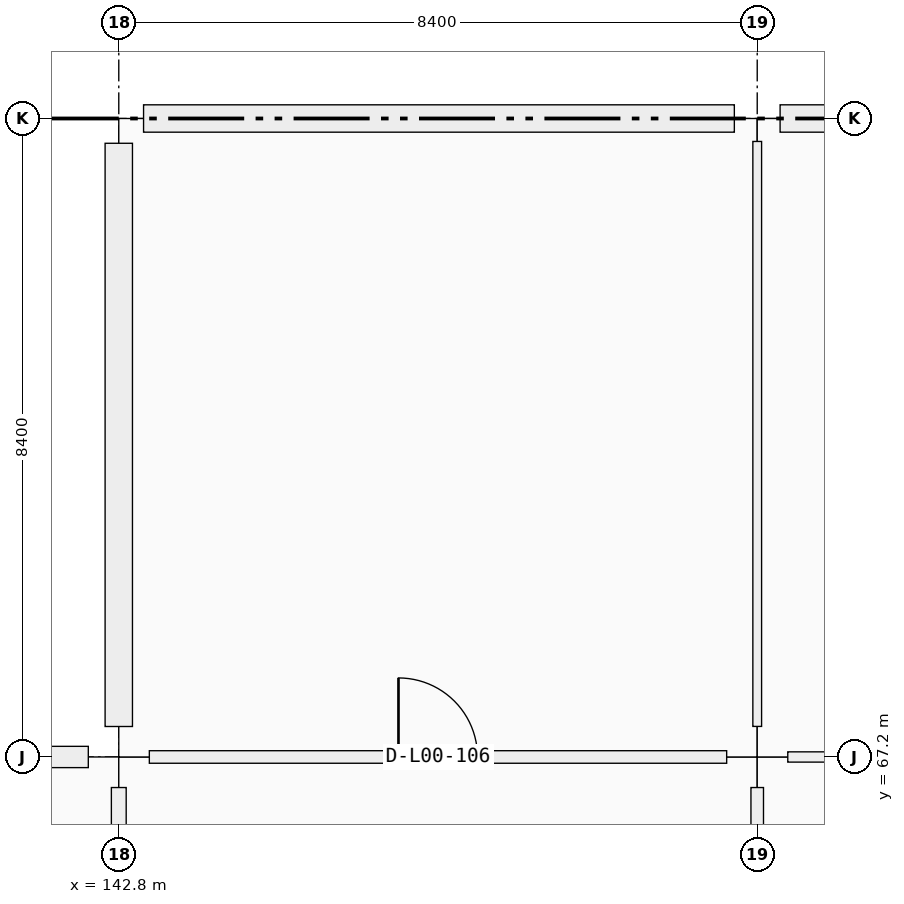
"""IFC4 building model, lengths in metres.
Left out: names, types, materials, properties, quantities, classifications, styles, units other than length and angle.
Written with IfcOpenShell. Run it as: python <this file> out.ifc"""

import sys

from ifc_helpers import new_model, si_unit, direction, frame, frame_2d, origin, origin_2d, place, context, subcontext, project, spatial, rectangle, extrude, element, fill, save


model = new_model("IFC4")
c1 = context("Model", 3, precision=1e-05, world=origin(), true_north=direction((0.0, 1.0)))
c2 = subcontext(c1, "Body", "Model", "MODEL_VIEW")
j1 = project(units=[si_unit("LENGTHUNIT", "METRE"), si_unit("PLANEANGLEUNIT", "RADIAN")], contexts=[c1])
p1 = place(None, origin())
s1 = spatial("IfcSite", under=j1, at=p1, CompositionType="ELEMENT")
p2 = place(p1, origin())
s2 = spatial("IfcBuilding", under=s1, at=p2, CompositionType="ELEMENT")
p3 = place(p2, origin())
s3 = spatial("IfcBuildingStorey", under=s2, at=p3, CompositionType="ELEMENT", Elevation=0.0)
p4 = place(p3, frame((142.8, 67.2, 0.0), z_axis=(0.0, 0.0, 1.0), x_axis=(1.0, 0.0, 0.0)))
e1 = element("IfcColumn", 1, at=p4, inside=s3, PredefinedType="COLUMN", context=c2, shape_type="SweptSolid", body=[
    extrude(rectangle(XDim=0.8, YDim=0.8, at=origin_2d()), origin(), (0.0, 0.0, 1.0), 5.76),
])
p5 = place(p3, frame((142.8, 75.6, 0.0), z_axis=(0.0, 0.0, 1.0), x_axis=(1.0, 0.0, 0.0)))
e2 = element("IfcColumn", 2, at=p5, inside=s3, PredefinedType="COLUMN", context=c2, shape_type="SweptSolid", body=[
    extrude(rectangle(XDim=0.65, YDim=0.65, at=origin_2d()), origin(), (0.0, 0.0, 1.0), 5.76),
])
p6 = place(p3, frame((151.2, 67.2, 0.0), z_axis=(0.0, 0.0, 1.0), x_axis=(1.0, 0.0, 0.0)))
e3 = element("IfcColumn", 3, at=p6, inside=s3, PredefinedType="COLUMN", context=c2, shape_type="SweptSolid", body=[
    extrude(rectangle(XDim=0.8, YDim=0.8, at=origin_2d()), origin(), (0.0, 0.0, 1.0), 5.76),
])
p7 = place(p3, frame((151.2, 75.6, 0.0), z_axis=(0.0, 0.0, 1.0), x_axis=(1.0, 0.0, 0.0)))
e4 = element("IfcColumn", 4, at=p7, inside=s3, PredefinedType="COLUMN", context=c2, shape_type="SweptSolid", body=[
    extrude(rectangle(XDim=0.6, YDim=0.6, at=origin_2d()), origin(), (0.0, 0.0, 1.0), 5.76),
])
p8 = place(p3, frame((134.776, 67.2, 0.0), z_axis=(0.0, 0.0, 1.0), x_axis=(1.0, 0.0, 0.0)))
e5 = element("IfcWall", 5, at=p8, inside=s3, PredefinedType="SOLIDWALL", context=c2, shape_type="SweptSolid", body=[
    extrude(rectangle(XDim=7.623, YDim=0.28, at=frame_2d((3.812, 0.0))), origin(), (0.0, 0.0, 1.0), 4.7),
])
p9 = place(p8, frame((2.537, 0.0, 0.9)))
e6 = element("IfcOpeningElement", 6, at=p9, cuts=e5, PredefinedType="OPENING", context=c2, shape_type="SweptSolid", body=[
    extrude(rectangle(XDim=2.55, YDim=1.95, at=frame_2d((1.275, 0.975))), frame((0.0, 0.14, 0.0), z_axis=(0.0, -1.0, 0.0), x_axis=(1.0, 0.0, 0.0)), (0.0, 0.0, 1.0), 0.28),
])
p10 = place(p3, frame((142.8, 67.601, 0.0), z_axis=(0.0, 0.0, 1.0), x_axis=(0.0, 1.0, 0.0)))
e7 = element("IfcWall", 7, at=p10, inside=s3, PredefinedType="SOLIDWALL", context=c2, shape_type="SweptSolid", body=[
    extrude(rectangle(XDim=7.673, YDim=0.36, at=frame_2d((3.836, 0.0))), origin(), (0.0, 0.0, 1.0), 4.7),
])
p11 = place(p10, frame((2.937, 0.0, 0.9)))
e8 = element("IfcOpeningElement", 8, at=p11, cuts=e7, PredefinedType="OPENING", context=c2, shape_type="SweptSolid", body=[
    extrude(rectangle(XDim=1.8, YDim=1.8, at=frame_2d((0.9, 0.9))), frame((0.0, 0.18, 0.0), z_axis=(0.0, -1.0, 0.0), x_axis=(1.0, 0.0, 0.0)), (0.0, 0.0, 1.0), 0.36),
])
p12 = place(p3, frame((143.126, 75.6, 0.0), z_axis=(0.0, 0.0, 1.0), x_axis=(1.0, 0.0, 0.0)))
e9 = element("IfcWall", 9, at=p12, inside=s3, PredefinedType="SOLIDWALL", context=c2, shape_type="SweptSolid", body=[
    extrude(rectangle(XDim=7.773, YDim=0.36, at=frame_2d((3.886, 0.0))), origin(), (0.0, 0.0, 1.0), 4.7),
])
p13 = place(p12, frame((2.837, 0.0, 0.9)))
e10 = element("IfcOpeningElement", 10, at=p13, cuts=e9, PredefinedType="OPENING", context=c2, shape_type="SweptSolid", body=[
    extrude(rectangle(XDim=2.1, YDim=1.8, at=frame_2d((1.05, 0.9))), frame((0.0, 0.18, 0.0), z_axis=(0.0, -1.0, 0.0), x_axis=(1.0, 0.0, 0.0)), (0.0, 0.0, 1.0), 0.36),
])
p14 = place(p3, frame((151.501, 75.6, 0.0), z_axis=(0.0, 0.0, 1.0), x_axis=(1.0, 0.0, 0.0)))
e11 = element("IfcWall", 11, at=p14, inside=s3, PredefinedType="SOLIDWALL", context=c2, shape_type="SweptSolid", body=[
    extrude(rectangle(XDim=7.773, YDim=0.36, at=frame_2d((3.886, 0.0))), origin(), (0.0, 0.0, 1.0), 4.7),
])
p15 = place(p14, frame((2.686, 0.0, 0.9)))
e12 = element("IfcOpeningElement", 12, at=p15, cuts=e11, PredefinedType="OPENING", context=c2, shape_type="SweptSolid", body=[
    extrude(rectangle(XDim=2.4, YDim=1.8, at=frame_2d((1.2, 0.9))), frame((0.0, 0.18, 0.0), z_axis=(0.0, -1.0, 0.0), x_axis=(1.0, 0.0, 0.0)), (0.0, 0.0, 1.0), 0.36),
])
p16 = place(p3, frame((143.202, 67.2, 0.0), z_axis=(0.0, 0.0, 1.0), x_axis=(1.0, 0.0, 0.0)))
e13 = element("IfcWall", 13, at=p16, inside=s3, PredefinedType="PARTITIONING", context=c2, shape_type="SweptSolid", body=[
    extrude(rectangle(XDim=7.596, YDim=0.165, at=frame_2d((3.798, 0.0))), origin(), (0.0, 0.0, 1.0), 3.66),
])
p17 = place(p16, frame((3.278, 0.0, 0.0)))
e14 = element("IfcOpeningElement", 14, at=p17, cuts=e13, PredefinedType="OPENING", context=c2, shape_type="SweptSolid", body=[
    extrude(rectangle(XDim=1.04, YDim=2.2, at=frame_2d((0.52, 1.1))), frame((0.0, 0.083, 0.0), z_axis=(0.0, -1.0, 0.0), x_axis=(1.0, 0.0, 0.0)), (0.0, 0.0, 1.0), 0.165),
])
p18 = place(p3, frame((151.602, 67.2, 0.0), z_axis=(0.0, 0.0, 1.0), x_axis=(1.0, 0.0, 0.0)))
e15 = element("IfcWall", 15, at=p18, inside=s3, PredefinedType="PARTITIONING", context=c2, shape_type="SweptSolid", body=[
    extrude(rectangle(XDim=7.596, YDim=0.135, at=frame_2d((3.798, 0.0))), origin(), (0.0, 0.0, 1.0), 3.66),
])
p19 = place(p18, frame((3.328, 0.0, 0.0)))
e16 = element("IfcOpeningElement", 16, at=p19, cuts=e15, PredefinedType="OPENING", context=c2, shape_type="SweptSolid", body=[
    extrude(rectangle(XDim=0.94, YDim=2.15, at=frame_2d((0.47, 1.075))), frame((0.0, 0.067, 0.0), z_axis=(0.0, -1.0, 0.0), x_axis=(1.0, 0.0, 0.0)), (0.0, 0.0, 1.0), 0.135),
])
p20 = place(p3, frame((142.8, 59.202, 0.0), z_axis=(0.0, 0.0, 1.0), x_axis=(0.0, 1.0, 0.0)))
e17 = element("IfcWall", 17, at=p20, inside=s3, PredefinedType="PARTITIONING", context=c2, shape_type="SweptSolid", body=[
    extrude(rectangle(XDim=7.596, YDim=0.195, at=frame_2d((3.798, 0.0))), origin(), (0.0, 0.0, 1.0), 3.66),
])
p21 = place(p20, frame((3.268, 0.0, 0.0)))
e18 = element("IfcOpeningElement", 18, at=p21, cuts=e17, PredefinedType="OPENING", context=c2, shape_type="SweptSolid", body=[
    extrude(rectangle(XDim=1.06, YDim=2.25, at=frame_2d((0.53, 1.125))), frame((0.0, 0.098, 0.0), z_axis=(0.0, -1.0, 0.0), x_axis=(1.0, 0.0, 0.0)), (0.0, 0.0, 1.0), 0.195),
])
p22 = place(p3, frame((151.2, 59.202, 0.0), z_axis=(0.0, 0.0, 1.0), x_axis=(0.0, 1.0, 0.0)))
e19 = element("IfcWall", 19, at=p22, inside=s3, PredefinedType="PARTITIONING", context=c2, shape_type="SweptSolid", body=[
    extrude(rectangle(XDim=7.596, YDim=0.165, at=frame_2d((3.798, 0.0))), origin(), (0.0, 0.0, 1.0), 3.66),
])
p23 = place(p22, frame((3.318, 0.0, 0.0)))
e20 = element("IfcOpeningElement", 20, at=p23, cuts=e19, PredefinedType="OPENING", context=c2, shape_type="SweptSolid", body=[
    extrude(rectangle(XDim=0.96, YDim=2.18, at=frame_2d((0.48, 1.09))), frame((0.0, 0.083, 0.0), z_axis=(0.0, -1.0, 0.0), x_axis=(1.0, 0.0, 0.0)), (0.0, 0.0, 1.0), 0.165),
])
p24 = place(p3, frame((151.2, 67.602, 0.0), z_axis=(0.0, 0.0, 1.0), x_axis=(0.0, 1.0, 0.0)))
e21 = element("IfcWall", 21, at=p24, inside=s3, PredefinedType="PARTITIONING", context=c2, shape_type="SweptSolid", body=[
    extrude(rectangle(XDim=7.696, YDim=0.115, at=frame_2d((3.848, 0.0))), origin(), (0.0, 0.0, 1.0), 3.66),
])
p25 = place(p24, frame((3.378, 0.0, 0.0)))
e22 = element("IfcOpeningElement", 22, at=p25, cuts=e21, PredefinedType="OPENING", context=c2, shape_type="SweptSolid", body=[
    extrude(rectangle(XDim=0.94, YDim=2.15, at=frame_2d((0.47, 1.075))), frame((0.0, 0.058, 0.0), z_axis=(0.0, -1.0, 0.0), x_axis=(1.0, 0.0, 0.0)), (0.0, 0.0, 1.0), 0.115),
])
p26 = place(p11, origin())
e23 = element("IfcWindow", 23, at=p26, inside=s3, PartitioningType="SINGLE_PANEL", PredefinedType="WINDOW", context=c2, shape_type="SweptSolid", body=[
    extrude(rectangle(XDim=1.8, YDim=1.8, at=frame_2d((0.9, 0.9))), frame((0.0, 0.03, 0.0), z_axis=(0.0, -1.0, 0.0), x_axis=(1.0, 0.0, 0.0)), (0.0, 0.0, 1.0), 0.06),
])
fill(e8, e23)
p27 = place(p13, origin())
e24 = element("IfcWindow", 24, at=p27, inside=s3, PartitioningType="SINGLE_PANEL", PredefinedType="WINDOW", context=c2, shape_type="SweptSolid", body=[
    extrude(rectangle(XDim=2.1, YDim=1.8, at=frame_2d((1.05, 0.9))), frame((0.0, 0.03, 0.0), z_axis=(0.0, -1.0, 0.0), x_axis=(1.0, 0.0, 0.0)), (0.0, 0.0, 1.0), 0.06),
])
fill(e10, e24)
p28 = place(p17, origin())
e25 = element("IfcDoor", 25, at=p28, inside=s3, OperationType="SINGLE_SWING_LEFT", PredefinedType="DOOR", context=c2, shape_type="SweptSolid", body=[
    extrude(rectangle(XDim=1.04, YDim=2.2, at=frame_2d((0.52, 1.1))), frame((0.0, 0.025, 0.0), z_axis=(0.0, -1.0, 0.0), x_axis=(1.0, 0.0, 0.0)), (0.0, 0.0, 1.0), 0.05),
])
fill(e14, e25)
p29 = place(p25, origin())
e26 = element("IfcDoor", 26, at=p29, inside=s3, OperationType="SINGLE_SWING_LEFT", PredefinedType="DOOR", context=c2, shape_type="SweptSolid", body=[
    extrude(rectangle(XDim=0.94, YDim=2.15, at=frame_2d((0.47, 1.075))), frame((0.0, 0.025, 0.0), z_axis=(0.0, -1.0, 0.0), x_axis=(1.0, 0.0, 0.0)), (0.0, 0.0, 1.0), 0.05),
])
fill(e22, e26)
save(model, sys.argv[1])
